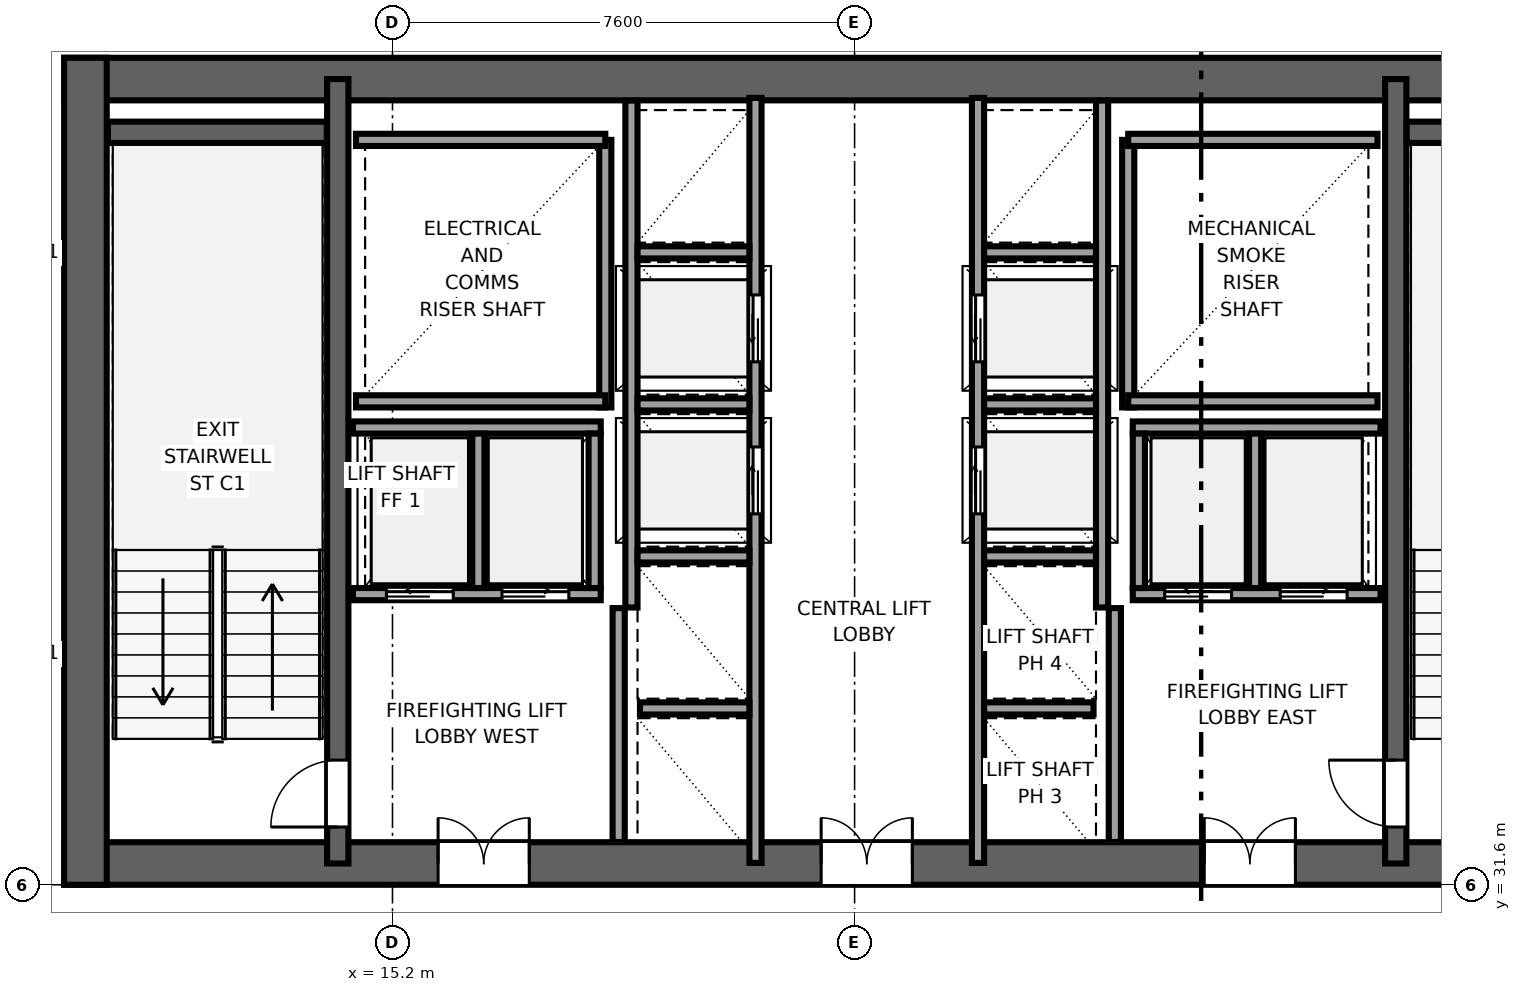
"""IFC4 building model, lengths in metres.
Left out: names, types, materials, properties, quantities, classifications, styles, units other than length and angle.
Written with IfcOpenShell. Run it as: python <this file> out.ifc"""

import sys

from ifc_helpers import new_model, si_unit, direction, frame, frame_2d, origin, place, context, subcontext, project, spatial, rectangle, extrude, source, transform, mapped, element, fill, save


model = new_model("IFC4")
c1 = context("Model", 3, precision=1e-05, world=origin(), true_north=direction((0.0, 1.0)))
c2 = subcontext(c1, "Body", "Model", "MODEL_VIEW")
j1 = project(units=[si_unit("LENGTHUNIT", "METRE"), si_unit("PLANEANGLEUNIT", "RADIAN")], contexts=[c1])
p1 = place(None, origin())
s1 = spatial("IfcSite", under=j1, at=p1, CompositionType="ELEMENT")
p2 = place(p1, origin())
s2 = spatial("IfcBuilding", under=s1, at=p2, CompositionType="ELEMENT")
p3 = place(p2, frame((0.0, 0.0, 194.65)))
s3 = spatial("IfcBuildingStorey", under=s2, at=p3, CompositionType="ELEMENT", Elevation=194.65)
p4 = place(p3, frame((9.8, 31.95, 0.0), z_axis=(0.0, 0.0, 1.0), x_axis=(1.0, 0.0, 0.0)))
e1 = element("IfcWall", 1, at=p4, inside=s3, PredefinedType="SHEAR", context=c2, shape_type="SweptSolid", body=[
    extrude(rectangle(XDim=26.4, YDim=0.7, at=frame_2d((13.2, 0.0))), origin(), (0.0, 0.0, 1.0), 3.55),
])
p5 = place(p4, frame((7.65, 0.0, 0.0), z_axis=(0.0, 0.0, 1.0), x_axis=(-1.0, 0.0, 0.0)))
e2 = element("IfcOpeningElement", 2, at=p5, cuts=e1, PredefinedType="OPENING", context=c2, shape_type="SweptSolid", body=[
    extrude(rectangle(XDim=1.5, YDim=2.04, at=frame_2d((0.75, 1.02))), frame((0.0, 0.36, 0.0), z_axis=(0.0, -1.0, 0.0), x_axis=(1.0, 0.0, 0.0)), (0.0, 0.0, 1.0), 0.72),
])
p6 = place(p4, frame((13.95, 0.0, 0.0), z_axis=(0.0, 0.0, 1.0), x_axis=(-1.0, 0.0, 0.0)))
e3 = element("IfcOpeningElement", 3, at=p6, cuts=e1, PredefinedType="OPENING", context=c2, shape_type="SweptSolid", body=[
    extrude(rectangle(XDim=1.5, YDim=2.04, at=frame_2d((0.75, 1.02))), frame((0.0, 0.36, 0.0), z_axis=(0.0, -1.0, 0.0), x_axis=(1.0, 0.0, 0.0)), (0.0, 0.0, 1.0), 0.72),
])
p7 = place(p4, frame((20.25, 0.0, 0.0), z_axis=(0.0, 0.0, 1.0), x_axis=(-1.0, 0.0, 0.0)))
e4 = element("IfcOpeningElement", 4, at=p7, cuts=e1, PredefinedType="OPENING", context=c2, shape_type="SweptSolid", body=[
    extrude(rectangle(XDim=1.5, YDim=2.04, at=frame_2d((0.75, 1.02))), frame((0.0, 0.36, 0.0), z_axis=(0.0, -1.0, 0.0), x_axis=(1.0, 0.0, 0.0)), (0.0, 0.0, 1.0), 0.72),
])
p8 = place(p3, frame((9.8, 44.85, 0.0), z_axis=(0.0, 0.0, 1.0), x_axis=(1.0, 0.0, 0.0)))
e5 = element("IfcWall", 5, at=p8, inside=s3, PredefinedType="SHEAR", context=c2, shape_type="SweptSolid", body=[
    extrude(rectangle(XDim=26.4, YDim=0.7, at=frame_2d((13.2, 0.0))), origin(), (0.0, 0.0, 1.0), 3.55),
])
p9 = place(p3, frame((10.15, 31.6, 0.0), z_axis=(0.0, 0.0, 1.0), x_axis=(0.0, 1.0, 0.0)))
e6 = element("IfcWall", 6, at=p9, inside=s3, PredefinedType="SHEAR", context=c2, shape_type="SweptSolid", body=[
    extrude(rectangle(XDim=13.6, YDim=0.7, at=frame_2d((6.8, 0.0))), origin(), (0.0, 0.0, 1.0), 3.55),
])
p10 = place(p3, frame((14.3, 31.95, 0.0), z_axis=(0.0, 0.0, 1.0), x_axis=(0.0, 1.0, 0.0)))
e7 = element("IfcWall", 7, at=p10, inside=s3, PredefinedType="SHEAR", context=c2, shape_type="SweptSolid", body=[
    extrude(rectangle(XDim=12.9, YDim=0.35, at=frame_2d((6.45, 0.0))), origin(), (0.0, 0.0, 1.0), 3.55),
])
p11 = place(p10, frame((0.6, 0.0, 0.0)))
e8 = element("IfcOpeningElement", 8, at=p11, cuts=e7, PredefinedType="OPENING", context=c2, shape_type="SweptSolid", body=[
    extrude(rectangle(XDim=1.1, YDim=2.12, at=frame_2d((0.55, 1.06))), frame((0.0, 0.185, 0.0), z_axis=(0.0, -1.0, 0.0), x_axis=(1.0, 0.0, 0.0)), (0.0, 0.0, 1.0), 0.37),
])
p12 = place(p3, frame((31.7, 31.95, 0.0), z_axis=(0.0, 0.0, 1.0), x_axis=(0.0, 1.0, 0.0)))
e9 = element("IfcWall", 9, at=p12, inside=s3, PredefinedType="SHEAR", context=c2, shape_type="SweptSolid", body=[
    extrude(rectangle(XDim=12.9, YDim=0.35, at=frame_2d((6.45, 0.0))), origin(), (0.0, 0.0, 1.0), 3.55),
])
p13 = place(p12, frame((1.7, 0.0, 0.0), z_axis=(0.0, 0.0, 1.0), x_axis=(-1.0, 0.0, 0.0)))
e10 = element("IfcOpeningElement", 10, at=p13, cuts=e9, PredefinedType="OPENING", context=c2, shape_type="SweptSolid", body=[
    extrude(rectangle(XDim=1.1, YDim=2.12, at=frame_2d((0.55, 1.06))), frame((0.0, 0.185, 0.0), z_axis=(0.0, -1.0, 0.0), x_axis=(1.0, 0.0, 0.0)), (0.0, 0.0, 1.0), 0.37),
])
for number, where, z_axis, x_axis in (
    (11, (10.52, 43.975, 0.0), (0.0, 0.0, 1.0), (1.0, 0.0, 0.0)),
    (12, (31.88, 43.975, 0.0), (0.0, 0.0, 1.0), (1.0, 0.0, 0.0)),
):
    element("IfcWall", number, at=place(p3, frame(where, z_axis=z_axis, x_axis=x_axis)), inside=s3, PredefinedType="SHEAR", context=c2, shape_type="SweptSolid", body=[
        extrude(rectangle(XDim=3.6, YDim=0.35, at=frame_2d((1.8, 0.0))), origin(), (0.0, 0.0, 1.0), 3.55),
    ])
p14 = place(p3, frame((18.7, 39.45, 0.0), z_axis=(0.0, 0.0, 1.0), x_axis=(0.0, 1.0, 0.0)))
e13 = element("IfcWall", 13, at=p14, inside=s3, PredefinedType="SOLIDWALL", context=c2, shape_type="SweptSolid", body=[
    extrude(rectangle(XDim=4.4, YDim=0.2, at=frame_2d((2.2, 0.0))), origin(), (0.0, 0.0, 1.0), 3.37),
])
for number, where, z_axis, x_axis in (
    (14, (14.6, 39.55, 0.0), (0.0, 0.0, 1.0), (1.0, 0.0, 0.0)),
    (15, (14.6, 43.85, 0.0), (0.0, 0.0, 1.0), (1.0, 0.0, 0.0)),
):
    element("IfcWall", number, at=place(p3, frame(where, z_axis=z_axis, x_axis=x_axis)), inside=s3, PredefinedType="SOLIDWALL", context=c2, shape_type="SweptSolid", body=[
        extrude(rectangle(XDim=4.1, YDim=0.2, at=frame_2d((2.05, 0.0))), origin(), (0.0, 0.0, 1.0), 3.37),
    ])
p15 = place(p3, frame((27.3, 39.45, 0.0), z_axis=(0.0, 0.0, 1.0), x_axis=(0.0, 1.0, 0.0)))
e16 = element("IfcWall", 16, at=p15, inside=s3, PredefinedType="SOLIDWALL", context=c2, shape_type="SweptSolid", body=[
    extrude(rectangle(XDim=4.4, YDim=0.2, at=frame_2d((2.2, 0.0))), origin(), (0.0, 0.0, 1.0), 3.37),
])
for number, where, z_axis, x_axis in (
    (17, (27.3, 39.55, 0.0), (0.0, 0.0, 1.0), (1.0, 0.0, 0.0)),
    (18, (27.3, 43.85, 0.0), (0.0, 0.0, 1.0), (1.0, 0.0, 0.0)),
):
    element("IfcWall", number, at=place(p3, frame(where, z_axis=z_axis, x_axis=x_axis)), inside=s3, PredefinedType="SOLIDWALL", context=c2, shape_type="SweptSolid", body=[
        extrude(rectangle(XDim=4.1, YDim=0.2, at=frame_2d((2.05, 0.0))), origin(), (0.0, 0.0, 1.0), 3.37),
    ])
for number, where, z_axis, x_axis in (
    (19, (18.92, 32.304, 0.0), (0.0, 0.0, 1.0), (0.0, 1.0, 0.0)),
    (20, (27.08, 32.304, 0.0), (0.0, 0.0, 1.0), (0.0, 1.0, 0.0)),
):
    element("IfcWall", number, at=place(p3, frame(where, z_axis=z_axis, x_axis=x_axis)), inside=s3, PredefinedType="SOLIDWALL", context=c2, shape_type="SweptSolid", body=[
        extrude(rectangle(XDim=3.846, YDim=0.2, at=frame_2d((1.923, 0.0))), origin(), (0.0, 0.0, 1.0), 3.37),
    ])
p16 = place(p3, frame((21.17, 31.96, 0.0), z_axis=(0.0, 0.0, 1.0), x_axis=(0.0, 1.0, 0.0)))
e21 = element("IfcWall", 21, at=p16, inside=s3, PredefinedType="SOLIDWALL", context=c2, shape_type="SweptSolid", body=[
    extrude(rectangle(XDim=12.58, YDim=0.2, at=frame_2d((6.29, 0.0))), origin(), (0.0, 0.0, 1.0), 3.37),
])
p17 = place(p16, frame((5.74, 0.0, 0.0)))
e22 = element("IfcOpeningElement", 22, at=p17, cuts=e21, PredefinedType="OPENING", context=c2, shape_type="SweptSolid", body=[
    extrude(rectangle(XDim=1.1, YDim=2.12, at=frame_2d((0.55, 1.06))), frame((0.0, 0.11, 0.0), z_axis=(0.0, -1.0, 0.0), x_axis=(1.0, 0.0, 0.0)), (0.0, 0.0, 1.0), 0.22),
])
p18 = place(p16, frame((8.24, 0.0, 0.0)))
e23 = element("IfcOpeningElement", 23, at=p18, cuts=e21, PredefinedType="OPENING", context=c2, shape_type="SweptSolid", body=[
    extrude(rectangle(XDim=1.1, YDim=2.12, at=frame_2d((0.55, 1.06))), frame((0.0, 0.11, 0.0), z_axis=(0.0, -1.0, 0.0), x_axis=(1.0, 0.0, 0.0)), (0.0, 0.0, 1.0), 0.22),
])
p19 = place(p3, frame((19.13, 36.16, 0.0), z_axis=(0.0, 0.0, 1.0), x_axis=(0.0, 1.0, 0.0)))
e24 = element("IfcWall", 24, at=p19, inside=s3, PredefinedType="SOLIDWALL", context=c2, shape_type="SweptSolid", body=[
    extrude(rectangle(XDim=8.336, YDim=0.2, at=frame_2d((4.168, 0.0))), origin(), (0.0, 0.0, 1.0), 3.37),
])
p20 = place(p3, frame((19.27, 34.5, 0.0), z_axis=(0.0, 0.0, 1.0), x_axis=(1.0, 0.0, 0.0)))
e25 = element("IfcWall", 25, at=p20, inside=s3, PredefinedType="SOLIDWALL", context=c2, shape_type="SweptSolid", body=[
    extrude(rectangle(XDim=1.8, YDim=0.2, at=frame_2d((0.9, 0.0))), origin(), (0.0, 0.0, 1.0), 3.37),
])
for number, where, z_axis, x_axis in (
    (26, (19.23, 37.0, 0.0), (0.0, 0.0, 1.0), (1.0, 0.0, 0.0)),
    (27, (19.23, 39.5, 0.0), (0.0, 0.0, 1.0), (1.0, 0.0, 0.0)),
    (28, (19.23, 42.0, 0.0), (0.0, 0.0, 1.0), (1.0, 0.0, 0.0)),
):
    element("IfcWall", number, at=place(p3, frame(where, z_axis=z_axis, x_axis=x_axis)), inside=s3, PredefinedType="SOLIDWALL", context=c2, shape_type="SweptSolid", body=[
        extrude(rectangle(XDim=1.84, YDim=0.2, at=frame_2d((0.92, 0.0))), origin(), (0.0, 0.0, 1.0), 3.37),
    ])
p21 = place(p3, frame((27.375, 36.38, 0.0), z_axis=(0.0, 0.0, 1.0), x_axis=(1.0, 0.0, 0.0)))
e29 = element("IfcWall", 29, at=p21, inside=s3, PredefinedType="SOLIDWALL", context=c2, shape_type="SweptSolid", body=[
    extrude(rectangle(XDim=4.075, YDim=0.2, at=frame_2d((2.038, 0.0))), origin(), (0.0, 0.0, 1.0), 3.37),
])
p22 = place(p21, frame((0.525, 0.0, 0.0)))
e30 = element("IfcOpeningElement", 30, at=p22, cuts=e29, PredefinedType="OPENING", context=c2, shape_type="SweptSolid", body=[
    extrude(rectangle(XDim=1.1, YDim=2.12, at=frame_2d((0.55, 1.06))), frame((0.0, 0.11, 0.0), z_axis=(0.0, -1.0, 0.0), x_axis=(1.0, 0.0, 0.0)), (0.0, 0.0, 1.0), 0.22),
])
p23 = place(p21, frame((2.425, 0.0, 0.0)))
e31 = element("IfcOpeningElement", 31, at=p23, cuts=e29, PredefinedType="OPENING", context=c2, shape_type="SweptSolid", body=[
    extrude(rectangle(XDim=1.1, YDim=2.12, at=frame_2d((0.55, 1.06))), frame((0.0, 0.11, 0.0), z_axis=(0.0, -1.0, 0.0), x_axis=(1.0, 0.0, 0.0)), (0.0, 0.0, 1.0), 0.22),
])
p24 = place(p3, frame((27.375, 39.12, 0.0), z_axis=(0.0, 0.0, 1.0), x_axis=(1.0, 0.0, 0.0)))
e32 = element("IfcWall", 32, at=p24, inside=s3, PredefinedType="SOLIDWALL", context=c2, shape_type="SweptSolid", body=[
    extrude(rectangle(XDim=4.075, YDim=0.2, at=frame_2d((2.038, 0.0))), origin(), (0.0, 0.0, 1.0), 3.37),
])
for number, where, z_axis, x_axis in (
    (33, (27.475, 36.48, 0.0), (0.0, 0.0, 1.0), (0.0, 1.0, 0.0)),
    (34, (29.387, 36.48, 0.0), (0.0, 0.0, 1.0), (0.0, 1.0, 0.0)),
):
    element("IfcWall", number, at=place(p3, frame(where, z_axis=z_axis, x_axis=x_axis)), inside=s3, PredefinedType="SOLIDWALL", context=c2, shape_type="SweptSolid", body=[
        extrude(rectangle(XDim=2.54, YDim=0.2, at=frame_2d((1.27, 0.0))), origin(), (0.0, 0.0, 1.0), 3.37),
    ])
p25 = place(p3, frame((14.55, 36.38, 0.0), z_axis=(0.0, 0.0, 1.0), x_axis=(1.0, 0.0, 0.0)))
e35 = element("IfcWall", 35, at=p25, inside=s3, PredefinedType="SOLIDWALL", context=c2, shape_type="SweptSolid", body=[
    extrude(rectangle(XDim=4.075, YDim=0.2, at=frame_2d((2.038, 0.0))), origin(), (0.0, 0.0, 1.0), 3.37),
])
p26 = place(p25, frame((0.55, 0.0, 0.0)))
e36 = element("IfcOpeningElement", 36, at=p26, cuts=e35, PredefinedType="OPENING", context=c2, shape_type="SweptSolid", body=[
    extrude(rectangle(XDim=1.1, YDim=2.12, at=frame_2d((0.55, 1.06))), frame((0.0, 0.11, 0.0), z_axis=(0.0, -1.0, 0.0), x_axis=(1.0, 0.0, 0.0)), (0.0, 0.0, 1.0), 0.22),
])
p27 = place(p25, frame((2.45, 0.0, 0.0)))
e37 = element("IfcOpeningElement", 37, at=p27, cuts=e35, PredefinedType="OPENING", context=c2, shape_type="SweptSolid", body=[
    extrude(rectangle(XDim=1.1, YDim=2.12, at=frame_2d((0.55, 1.06))), frame((0.0, 0.11, 0.0), z_axis=(0.0, -1.0, 0.0), x_axis=(1.0, 0.0, 0.0)), (0.0, 0.0, 1.0), 0.22),
])
p28 = place(p3, frame((14.55, 39.12, 0.0), z_axis=(0.0, 0.0, 1.0), x_axis=(1.0, 0.0, 0.0)))
e38 = element("IfcWall", 38, at=p28, inside=s3, PredefinedType="SOLIDWALL", context=c2, shape_type="SweptSolid", body=[
    extrude(rectangle(XDim=4.075, YDim=0.2, at=frame_2d((2.038, 0.0))), origin(), (0.0, 0.0, 1.0), 3.37),
])
for number, where, z_axis, x_axis in (
    (39, (18.525, 36.48, 0.0), (0.0, 0.0, 1.0), (0.0, 1.0, 0.0)),
    (40, (16.613, 36.48, 0.0), (0.0, 0.0, 1.0), (0.0, 1.0, 0.0)),
):
    element("IfcWall", number, at=place(p3, frame(where, z_axis=z_axis, x_axis=x_axis)), inside=s3, PredefinedType="SOLIDWALL", context=c2, shape_type="SweptSolid", body=[
        extrude(rectangle(XDim=2.54, YDim=0.2, at=frame_2d((1.27, 0.0))), origin(), (0.0, 0.0, 1.0), 3.37),
    ])
p29 = place(p3, frame((24.83, 31.96, 0.0), z_axis=(0.0, 0.0, 1.0), x_axis=(0.0, 1.0, 0.0)))
e41 = element("IfcWall", 41, at=p29, inside=s3, PredefinedType="SOLIDWALL", context=c2, shape_type="SweptSolid", body=[
    extrude(rectangle(XDim=12.58, YDim=0.2, at=frame_2d((6.29, 0.0))), origin(), (0.0, 0.0, 1.0), 3.37),
])
p30 = place(p29, frame((5.74, 0.0, 0.0)))
e42 = element("IfcOpeningElement", 42, at=p30, cuts=e41, PredefinedType="OPENING", context=c2, shape_type="SweptSolid", body=[
    extrude(rectangle(XDim=1.1, YDim=2.12, at=frame_2d((0.55, 1.06))), frame((0.0, 0.11, 0.0), z_axis=(0.0, -1.0, 0.0), x_axis=(1.0, 0.0, 0.0)), (0.0, 0.0, 1.0), 0.22),
])
p31 = place(p29, frame((8.24, 0.0, 0.0)))
e43 = element("IfcOpeningElement", 43, at=p31, cuts=e41, PredefinedType="OPENING", context=c2, shape_type="SweptSolid", body=[
    extrude(rectangle(XDim=1.1, YDim=2.12, at=frame_2d((0.55, 1.06))), frame((0.0, 0.11, 0.0), z_axis=(0.0, -1.0, 0.0), x_axis=(1.0, 0.0, 0.0)), (0.0, 0.0, 1.0), 0.22),
])
p32 = place(p3, frame((26.87, 36.16, 0.0), z_axis=(0.0, 0.0, 1.0), x_axis=(0.0, 1.0, 0.0)))
e44 = element("IfcWall", 44, at=p32, inside=s3, PredefinedType="SOLIDWALL", context=c2, shape_type="SweptSolid", body=[
    extrude(rectangle(XDim=8.336, YDim=0.2, at=frame_2d((4.168, 0.0))), origin(), (0.0, 0.0, 1.0), 3.37),
])
p33 = place(p3, frame((24.93, 34.5, 0.0), z_axis=(0.0, 0.0, 1.0), x_axis=(1.0, 0.0, 0.0)))
e45 = element("IfcWall", 45, at=p33, inside=s3, PredefinedType="SOLIDWALL", context=c2, shape_type="SweptSolid", body=[
    extrude(rectangle(XDim=1.8, YDim=0.2, at=frame_2d((0.9, 0.0))), origin(), (0.0, 0.0, 1.0), 3.37),
])
for number, where, z_axis, x_axis in (
    (46, (24.93, 37.0, 0.0), (0.0, 0.0, 1.0), (1.0, 0.0, 0.0)),
    (47, (24.93, 39.5, 0.0), (0.0, 0.0, 1.0), (1.0, 0.0, 0.0)),
    (48, (24.93, 42.0, 0.0), (0.0, 0.0, 1.0), (1.0, 0.0, 0.0)),
):
    element("IfcWall", number, at=place(p3, frame(where, z_axis=z_axis, x_axis=x_axis)), inside=s3, PredefinedType="SOLIDWALL", context=c2, shape_type="SweptSolid", body=[
        extrude(rectangle(XDim=1.84, YDim=0.2, at=frame_2d((0.92, 0.0))), origin(), (0.0, 0.0, 1.0), 3.37),
    ])
m1 = source(origin(), c2, "Body", "SweptSolid", [
    extrude(rectangle(XDim=1.1, YDim=2.12, at=frame_2d((0.55, 1.06))), frame((0.0, 0.025, 0.0), z_axis=(0.0, -1.0, 0.0), x_axis=(1.0, 0.0, 0.0)), (0.0, 0.0, 1.0), 0.05),
])
p34 = place(p11, origin())
e49 = element("IfcDoor", 49, at=p34, inside=s3, OperationType="SINGLE_SWING_LEFT", PredefinedType="DOOR", context=c2, shape_type="MappedRepresentation", body=[
    mapped(m1, transform((0.0, 0.0, 0.0), x_axis=(1.0, 0.0, 0.0), y_axis=(0.0, 1.0, 0.0), z_axis=(0.0, 0.0, 1.0), scale=1.0)),
])
fill(e8, e49)
p35 = place(p13, origin())
e50 = element("IfcDoor", 50, at=p35, inside=s3, OperationType="SINGLE_SWING_RIGHT", PredefinedType="DOOR", context=c2, shape_type="MappedRepresentation", body=[
    mapped(m1, transform((0.0, 0.0, 0.0), x_axis=(1.0, 0.0, 0.0), y_axis=(0.0, 1.0, 0.0), z_axis=(0.0, 0.0, 1.0), scale=1.0)),
])
fill(e10, e50)
m2 = source(origin(), c2, "Body", "SweptSolid", [
    extrude(rectangle(XDim=1.5, YDim=2.04, at=frame_2d((0.75, 1.02))), frame((0.0, 0.025, 0.0), z_axis=(0.0, -1.0, 0.0), x_axis=(1.0, 0.0, 0.0)), (0.0, 0.0, 1.0), 0.05),
])
p36 = place(p5, origin())
e51 = element("IfcDoor", 51, at=p36, inside=s3, OperationType="DOUBLE_DOOR_SINGLE_SWING", PredefinedType="DOOR", context=c2, shape_type="MappedRepresentation", body=[
    mapped(m2, transform((0.0, 0.0, 0.0), x_axis=(1.0, 0.0, 0.0), y_axis=(0.0, 1.0, 0.0), z_axis=(0.0, 0.0, 1.0), scale=1.0)),
])
fill(e2, e51)
p37 = place(p6, origin())
e52 = element("IfcDoor", 52, at=p37, inside=s3, OperationType="DOUBLE_DOOR_SINGLE_SWING", PredefinedType="DOOR", context=c2, shape_type="MappedRepresentation", body=[
    mapped(m2, transform((0.0, 0.0, 0.0), x_axis=(1.0, 0.0, 0.0), y_axis=(0.0, 1.0, 0.0), z_axis=(0.0, 0.0, 1.0), scale=1.0)),
])
fill(e3, e52)
p38 = place(p7, origin())
e53 = element("IfcDoor", 53, at=p38, inside=s3, OperationType="DOUBLE_DOOR_SINGLE_SWING", PredefinedType="DOOR", context=c2, shape_type="MappedRepresentation", body=[
    mapped(m2, transform((0.0, 0.0, 0.0), x_axis=(1.0, 0.0, 0.0), y_axis=(0.0, 1.0, 0.0), z_axis=(0.0, 0.0, 1.0), scale=1.0)),
])
fill(e4, e53)
m3 = source(origin(), c2, "Body", "SweptSolid", [
    extrude(rectangle(XDim=1.1, YDim=2.12, at=frame_2d((0.55, 1.06))), frame((0.0, 0.025, 0.0), z_axis=(0.0, -1.0, 0.0), x_axis=(1.0, 0.0, 0.0)), (0.0, 0.0, 1.0), 0.05),
])
p39 = place(p17, origin())
e54 = element("IfcDoor", 54, at=p39, inside=s3, OperationType="SLIDING_TO_RIGHT", PredefinedType="DOOR", context=c2, shape_type="MappedRepresentation", body=[
    mapped(m3, transform((0.0, 0.0, 0.0), x_axis=(1.0, 0.0, 0.0), y_axis=(0.0, 1.0, 0.0), z_axis=(0.0, 0.0, 1.0), scale=1.0)),
])
fill(e22, e54)
p40 = place(p18, origin())
e55 = element("IfcDoor", 55, at=p40, inside=s3, OperationType="SLIDING_TO_LEFT", PredefinedType="DOOR", context=c2, shape_type="MappedRepresentation", body=[
    mapped(m3, transform((0.0, 0.0, 0.0), x_axis=(1.0, 0.0, 0.0), y_axis=(0.0, 1.0, 0.0), z_axis=(0.0, 0.0, 1.0), scale=1.0)),
])
fill(e23, e55)
p41 = place(p22, origin())
e56 = element("IfcDoor", 56, at=p41, inside=s3, OperationType="SLIDING_TO_LEFT", PredefinedType="DOOR", context=c2, shape_type="MappedRepresentation", body=[
    mapped(m3, transform((0.0, 0.0, 0.0), x_axis=(1.0, 0.0, 0.0), y_axis=(0.0, 1.0, 0.0), z_axis=(0.0, 0.0, 1.0), scale=1.0)),
])
fill(e30, e56)
p42 = place(p23, origin())
e57 = element("IfcDoor", 57, at=p42, inside=s3, OperationType="SLIDING_TO_RIGHT", PredefinedType="DOOR", context=c2, shape_type="MappedRepresentation", body=[
    mapped(m3, transform((0.0, 0.0, 0.0), x_axis=(1.0, 0.0, 0.0), y_axis=(0.0, 1.0, 0.0), z_axis=(0.0, 0.0, 1.0), scale=1.0)),
])
fill(e31, e57)
p43 = place(p26, origin())
e58 = element("IfcDoor", 58, at=p43, inside=s3, OperationType="SLIDING_TO_LEFT", PredefinedType="DOOR", context=c2, shape_type="MappedRepresentation", body=[
    mapped(m3, transform((0.0, 0.0, 0.0), x_axis=(1.0, 0.0, 0.0), y_axis=(0.0, 1.0, 0.0), z_axis=(0.0, 0.0, 1.0), scale=1.0)),
])
fill(e36, e58)
p44 = place(p27, origin())
e59 = element("IfcDoor", 59, at=p44, inside=s3, OperationType="SLIDING_TO_RIGHT", PredefinedType="DOOR", context=c2, shape_type="MappedRepresentation", body=[
    mapped(m3, transform((0.0, 0.0, 0.0), x_axis=(1.0, 0.0, 0.0), y_axis=(0.0, 1.0, 0.0), z_axis=(0.0, 0.0, 1.0), scale=1.0)),
])
fill(e37, e59)
p45 = place(p30, origin())
e60 = element("IfcDoor", 60, at=p45, inside=s3, OperationType="SLIDING_TO_RIGHT", PredefinedType="DOOR", context=c2, shape_type="MappedRepresentation", body=[
    mapped(m3, transform((0.0, 0.0, 0.0), x_axis=(1.0, 0.0, 0.0), y_axis=(0.0, 1.0, 0.0), z_axis=(0.0, 0.0, 1.0), scale=1.0)),
])
fill(e42, e60)
p46 = place(p31, origin())
e61 = element("IfcDoor", 61, at=p46, inside=s3, OperationType="SLIDING_TO_LEFT", PredefinedType="DOOR", context=c2, shape_type="MappedRepresentation", body=[
    mapped(m3, transform((0.0, 0.0, 0.0), x_axis=(1.0, 0.0, 0.0), y_axis=(0.0, 1.0, 0.0), z_axis=(0.0, 0.0, 1.0), scale=1.0)),
])
fill(e43, e61)
save(model, sys.argv[1])
